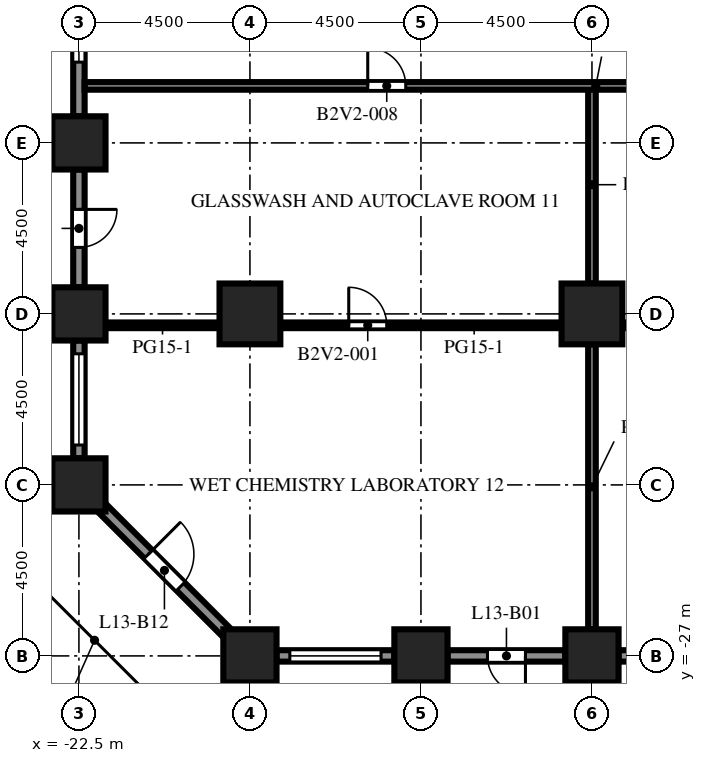
"""IFC4 building model, lengths in metres.
Left out: names, types, materials, properties, quantities, classifications, styles, units other than length and angle.
Written with IfcOpenShell. Run it as: python <this file> out.ifc"""

import sys

from ifc_helpers import new_model, si_unit, direction, frame, frame_2d, origin, origin_2d, place, context, subcontext, project, spatial, rectangle, extrude, element, fill, save


model = new_model("IFC4")
c1 = context("Model", 3, precision=1e-05, world=origin(), true_north=direction((0.0, 1.0)))
c2 = subcontext(c1, "Body", "Model", "MODEL_VIEW")
j1 = project(units=[si_unit("LENGTHUNIT", "METRE"), si_unit("PLANEANGLEUNIT", "RADIAN")], contexts=[c1])
p1 = place(None, origin())
s1 = spatial("IfcSite", under=j1, at=p1, CompositionType="ELEMENT")
p2 = place(p1, origin())
s2 = spatial("IfcBuilding", under=s1, at=p2, CompositionType="ELEMENT")
p3 = place(p2, frame((0.0, 0.0, 58.3)))
s3 = spatial("IfcBuildingStorey", under=s2, at=p3, CompositionType="ELEMENT", Elevation=58.3)
for number, where, z_axis, x_axis in (
    (1, (-22.5, -22.5, 0.0), (0.0, 0.0, 1.0), (1.0, 0.0, 0.0)),
    (2, (-22.5, -18.0, 0.0), (0.0, 0.0, 1.0), (1.0, 0.0, 0.0)),
    (3, (-22.5, -13.5, 0.0), (0.0, 0.0, 1.0), (1.0, 0.0, 0.0)),
    (4, (-18.0, -27.0, 0.0), (0.0, 0.0, 1.0), (1.0, 0.0, 0.0)),
    (5, (-13.5, -27.0, 0.0), (0.0, 0.0, 1.0), (1.0, 0.0, 0.0)),
    (6, (-9.0, -27.0, 0.0), (0.0, 0.0, 1.0), (1.0, 0.0, 0.0)),
):
    element("IfcColumn", number, at=place(p3, frame(where, z_axis=z_axis, x_axis=x_axis)), inside=s3, PredefinedType="COLUMN", context=c2, shape_type="SweptSolid", body=[
        extrude(rectangle(XDim=1.4, YDim=1.4, at=origin_2d()), origin(), (0.0, 0.0, 1.0), 4.1),
    ])
for number, where, z_axis, x_axis in (
    (7, (-18.0, -18.0, 0.0), (0.0, 0.0, 1.0), (1.0, 0.0, 0.0)),
    (8, (-9.0, -18.0, 0.0), (0.0, 0.0, 1.0), (1.0, 0.0, 0.0)),
):
    element("IfcColumn", number, at=place(p3, frame(where, z_axis=z_axis, x_axis=x_axis)), inside=s3, PredefinedType="COLUMN", context=c2, shape_type="SweptSolid", body=[
        extrude(rectangle(XDim=1.6, YDim=1.6, at=origin_2d()), origin(), (0.0, 0.0, 1.0), 4.1),
    ])
p4 = place(p3, frame((-14.2, -27.0, 0.0), z_axis=(0.0, 0.0, 1.0), x_axis=(-1.0, 0.0, 0.0)))
e9 = element("IfcWall", 9, at=p4, inside=s3, PredefinedType="SOLIDWALL", context=c2, shape_type="SweptSolid", body=[
    extrude(rectangle(XDim=3.1, YDim=0.3, at=frame_2d((1.55, 0.0))), origin(), (0.0, 0.0, 1.0), 2.75),
])
p5 = place(p4, frame((0.35, 0.0, 0.8)))
e10 = element("IfcOpeningElement", 10, at=p5, cuts=e9, PredefinedType="OPENING", context=c2, shape_type="SweptSolid", body=[
    extrude(rectangle(XDim=2.4, YDim=1.7, at=frame_2d((1.2, 0.85))), frame((0.0, 0.16, 0.0), z_axis=(0.0, -1.0, 0.0), x_axis=(1.0, 0.0, 0.0)), (0.0, 0.0, 1.0), 0.32),
])
p6 = place(p3, frame((-9.7, -27.0, 0.0), z_axis=(0.0, 0.0, 1.0), x_axis=(-1.0, 0.0, 0.0)))
e11 = element("IfcWall", 11, at=p6, inside=s3, PredefinedType="SOLIDWALL", context=c2, shape_type="SweptSolid", body=[
    extrude(rectangle(XDim=3.1, YDim=0.3, at=frame_2d((1.55, 0.0))), origin(), (0.0, 0.0, 1.0), 2.75),
])
p7 = place(p6, frame((1.05, 0.0, 0.0)))
e12 = element("IfcOpeningElement", 12, at=p7, cuts=e11, PredefinedType="OPENING", context=c2, shape_type="SweptSolid", body=[
    extrude(rectangle(XDim=1.0, YDim=2.2, at=frame_2d((0.5, 1.1))), frame((0.0, 0.16, 0.0), z_axis=(0.0, -1.0, 0.0), x_axis=(1.0, 0.0, 0.0)), (0.0, 0.0, 1.0), 0.32),
])
p8 = place(p3, frame((-5.2, -27.0, 0.0), z_axis=(0.0, 0.0, 1.0), x_axis=(-1.0, 0.0, 0.0)))
e13 = element("IfcWall", 13, at=p8, inside=s3, PredefinedType="SOLIDWALL", context=c2, shape_type="SweptSolid", body=[
    extrude(rectangle(XDim=3.1, YDim=0.3, at=frame_2d((1.55, 0.0))), origin(), (0.0, 0.0, 1.0), 2.75),
])
p9 = place(p8, frame((0.35, 0.0, 0.8)))
e14 = element("IfcOpeningElement", 14, at=p9, cuts=e13, PredefinedType="OPENING", context=c2, shape_type="SweptSolid", body=[
    extrude(rectangle(XDim=2.4, YDim=1.7, at=frame_2d((1.2, 0.85))), frame((0.0, 0.16, 0.0), z_axis=(0.0, -1.0, 0.0), x_axis=(1.0, 0.0, 0.0)), (0.0, 0.0, 1.0), 0.32),
])
p10 = place(p3, frame((-22.5, -12.8, 0.0), z_axis=(0.0, 0.0, 1.0), x_axis=(0.0, 1.0, 0.0)))
e15 = element("IfcWall", 15, at=p10, inside=s3, PredefinedType="SOLIDWALL", context=c2, shape_type="SweptSolid", body=[
    extrude(rectangle(XDim=3.1, YDim=0.3, at=frame_2d((1.55, 0.0))), origin(), (0.0, 0.0, 1.0), 2.75),
])
p11 = place(p10, frame((1.425, 0.0, 0.8)))
e16 = element("IfcOpeningElement", 16, at=p11, cuts=e15, PredefinedType="OPENING", context=c2, shape_type="SweptSolid", body=[
    extrude(rectangle(XDim=1.2, YDim=1.7, at=frame_2d((0.6, 0.85))), frame((0.0, 0.16, 0.0), z_axis=(0.0, -1.0, 0.0), x_axis=(1.0, 0.0, 0.0)), (0.0, 0.0, 1.0), 0.32),
])
p12 = place(p3, frame((-22.5, -17.3, 0.0), z_axis=(0.0, 0.0, 1.0), x_axis=(0.0, 1.0, 0.0)))
e17 = element("IfcWall", 17, at=p12, inside=s3, PredefinedType="SOLIDWALL", context=c2, shape_type="SweptSolid", body=[
    extrude(rectangle(XDim=3.1, YDim=0.3, at=frame_2d((1.55, 0.0))), origin(), (0.0, 0.0, 1.0), 2.75),
])
p13 = place(p12, frame((1.05, 0.0, 0.0)))
e18 = element("IfcOpeningElement", 18, at=p13, cuts=e17, PredefinedType="OPENING", context=c2, shape_type="SweptSolid", body=[
    extrude(rectangle(XDim=1.0, YDim=2.2, at=frame_2d((0.5, 1.1))), frame((0.0, 0.16, 0.0), z_axis=(0.0, -1.0, 0.0), x_axis=(1.0, 0.0, 0.0)), (0.0, 0.0, 1.0), 0.32),
])
p14 = place(p3, frame((-22.5, -21.8, 0.0), z_axis=(0.0, 0.0, 1.0), x_axis=(0.0, 1.0, 0.0)))
e19 = element("IfcWall", 19, at=p14, inside=s3, PredefinedType="SOLIDWALL", context=c2, shape_type="SweptSolid", body=[
    extrude(rectangle(XDim=3.1, YDim=0.3, at=frame_2d((1.55, 0.0))), origin(), (0.0, 0.0, 1.0), 2.75),
])
p15 = place(p14, frame((0.35, 0.0, 0.8)))
e20 = element("IfcOpeningElement", 20, at=p15, cuts=e19, PredefinedType="OPENING", context=c2, shape_type="SweptSolid", body=[
    extrude(rectangle(XDim=2.4, YDim=1.7, at=frame_2d((1.2, 0.85))), frame((0.0, 0.16, 0.0), z_axis=(0.0, -1.0, 0.0), x_axis=(1.0, 0.0, 0.0)), (0.0, 0.0, 1.0), 0.32),
])
p16 = place(p3, frame((-18.594, -26.406, 0.0), z_axis=(0.0, 0.0, 1.0), x_axis=(-0.707106781187, 0.707106781187, 0.0)))
e21 = element("IfcWall", 21, at=p16, inside=s3, PredefinedType="SOLIDWALL", context=c2, shape_type="SweptSolid", body=[
    extrude(rectangle(XDim=4.684, YDim=0.3, at=frame_2d((2.342, 0.0))), origin(), (0.0, 0.0, 1.0), 2.75),
])
p17 = place(p16, frame((1.742, 0.0, 0.0)))
e22 = element("IfcOpeningElement", 22, at=p17, cuts=e21, PredefinedType="OPENING", context=c2, shape_type="SweptSolid", body=[
    extrude(rectangle(XDim=1.2, YDim=2.2, at=frame_2d((0.6, 1.1))), frame((0.0, 0.16, 0.0), z_axis=(0.0, -1.0, 0.0), x_axis=(1.0, 0.0, 0.0)), (0.0, 0.0, 1.0), 0.32),
])
p18 = place(p3, frame((-9.0, -26.3, 0.0), z_axis=(0.0, 0.0, 1.0), x_axis=(0.0, 1.0, 0.0)))
e23 = element("IfcWall", 23, at=p18, inside=s3, PredefinedType="PARTITIONING", context=c2, shape_type="SweptSolid", body=[
    extrude(rectangle(XDim=7.5, YDim=0.2, at=frame_2d((3.75, 0.0))), origin(), (0.0, 0.0, 1.0), 3.65),
])
p19 = place(p3, frame((-9.0, -17.2, 0.0), z_axis=(0.0, 0.0, 1.0), x_axis=(0.0, 1.0, 0.0)))
e24 = element("IfcWall", 24, at=p19, inside=s3, PredefinedType="PARTITIONING", context=c2, shape_type="SweptSolid", body=[
    extrude(rectangle(XDim=5.2, YDim=0.2, at=frame_2d((2.6, 0.0))), origin(), (0.0, 0.0, 1.0), 3.65),
])
p20 = place(p3, frame((-21.8, -18.3, 0.0), z_axis=(0.0, 0.0, 1.0), x_axis=(1.0, 0.0, 0.0)))
e25 = element("IfcWall", 25, at=p20, inside=s3, PredefinedType="PARTITIONING", context=c2, shape_type="SweptSolid", body=[
    extrude(rectangle(XDim=3.0, YDim=0.15, at=frame_2d((1.5, 0.0))), origin(), (0.0, 0.0, 1.0), 3.65),
])
p21 = place(p3, frame((-9.8, -18.3, 0.0), z_axis=(0.0, 0.0, 1.0), x_axis=(-1.0, 0.0, 0.0)))
e26 = element("IfcWall", 26, at=p21, inside=s3, PredefinedType="PARTITIONING", context=c2, shape_type="SweptSolid", body=[
    extrude(rectangle(XDim=7.4, YDim=0.15, at=frame_2d((3.7, 0.0))), origin(), (0.0, 0.0, 1.0), 3.65),
])
p22 = place(p21, frame((4.6, 0.0, 0.0)))
e27 = element("IfcOpeningElement", 27, at=p22, cuts=e26, PredefinedType="OPENING", context=c2, shape_type="SweptSolid", body=[
    extrude(rectangle(XDim=1.0, YDim=2.1, at=frame_2d((0.5, 1.05))), frame((0.0, 0.085, 0.0), z_axis=(0.0, -1.0, 0.0), x_axis=(1.0, 0.0, 0.0)), (0.0, 0.0, 1.0), 0.17),
])
p23 = place(p3, frame((-0.8, -18.3, 0.0), z_axis=(0.0, 0.0, 1.0), x_axis=(-1.0, 0.0, 0.0)))
e28 = element("IfcWall", 28, at=p23, inside=s3, PredefinedType="PARTITIONING", context=c2, shape_type="SweptSolid", body=[
    extrude(rectangle(XDim=7.4, YDim=0.15, at=frame_2d((3.7, 0.0))), origin(), (0.0, 0.0, 1.0), 3.65),
])
p24 = place(p23, frame((1.85, 0.0, 0.0)))
e29 = element("IfcOpeningElement", 29, at=p24, cuts=e28, PredefinedType="OPENING", context=c2, shape_type="SweptSolid", body=[
    extrude(rectangle(XDim=1.0, YDim=2.1, at=frame_2d((0.5, 1.05))), frame((0.0, 0.085, 0.0), z_axis=(0.0, -1.0, 0.0), x_axis=(1.0, 0.0, 0.0)), (0.0, 0.0, 1.0), 0.17),
])
p25 = place(p3, frame((31.35, -12.0, 0.0), z_axis=(0.0, 0.0, 1.0), x_axis=(-1.0, 0.0, 0.0)))
e30 = element("IfcWall", 30, at=p25, inside=s3, PredefinedType="PARTITIONING", context=c2, shape_type="SweptSolid", body=[
    extrude(rectangle(XDim=53.7, YDim=0.2, at=frame_2d((26.85, 0.0))), origin(), (0.0, 0.0, 1.0), 3.65),
])
p26 = place(p25, frame((45.25, 0.0, 0.0)))
e31 = element("IfcOpeningElement", 31, at=p26, cuts=e30, PredefinedType="OPENING", context=c2, shape_type="SweptSolid", body=[
    extrude(rectangle(XDim=1.0, YDim=2.1, at=frame_2d((0.5, 1.05))), frame((0.0, 0.11, 0.0), z_axis=(0.0, -1.0, 0.0), x_axis=(1.0, 0.0, 0.0)), (0.0, 0.0, 1.0), 0.22),
])
p27 = place(p25, frame((34.25, 0.0, 0.0)))
e32 = element("IfcOpeningElement", 32, at=p27, cuts=e30, PredefinedType="OPENING", context=c2, shape_type="SweptSolid", body=[
    extrude(rectangle(XDim=1.0, YDim=2.1, at=frame_2d((0.5, 1.05))), frame((0.0, 0.11, 0.0), z_axis=(0.0, -1.0, 0.0), x_axis=(1.0, 0.0, 0.0)), (0.0, 0.0, 1.0), 0.22),
])
p28 = place(p25, frame((25.5, 0.0, 0.0)))
e33 = element("IfcOpeningElement", 33, at=p28, cuts=e30, PredefinedType="OPENING", context=c2, shape_type="SweptSolid", body=[
    extrude(rectangle(XDim=1.0, YDim=2.1, at=frame_2d((0.5, 1.05))), frame((0.0, 0.11, 0.0), z_axis=(0.0, -1.0, 0.0), x_axis=(1.0, 0.0, 0.0)), (0.0, 0.0, 1.0), 0.22),
])
p29 = place(p25, frame((15.0, 0.0, 0.0)))
e34 = element("IfcOpeningElement", 34, at=p29, cuts=e30, PredefinedType="OPENING", context=c2, shape_type="SweptSolid", body=[
    extrude(rectangle(XDim=1.0, YDim=2.1, at=frame_2d((0.5, 1.05))), frame((0.0, 0.11, 0.0), z_axis=(0.0, -1.0, 0.0), x_axis=(1.0, 0.0, 0.0)), (0.0, 0.0, 1.0), 0.22),
])
p30 = place(p25, frame((5.0, 0.0, 0.0)))
e35 = element("IfcOpeningElement", 35, at=p30, cuts=e30, PredefinedType="OPENING", context=c2, shape_type="SweptSolid", body=[
    extrude(rectangle(XDim=1.0, YDim=2.1, at=frame_2d((0.5, 1.05))), frame((0.0, 0.11, 0.0), z_axis=(0.0, -1.0, 0.0), x_axis=(1.0, 0.0, 0.0)), (0.0, 0.0, 1.0), 0.22),
])
p31 = place(p5, origin())
e36 = element("IfcWindow", 36, at=p31, inside=s3, PartitioningType="SINGLE_PANEL", PredefinedType="WINDOW", context=c2, shape_type="SweptSolid", body=[
    extrude(rectangle(XDim=2.4, YDim=1.7, at=frame_2d((1.2, 0.85))), frame((0.0, 0.03, 0.0), z_axis=(0.0, -1.0, 0.0), x_axis=(1.0, 0.0, 0.0)), (0.0, 0.0, 1.0), 0.06),
])
fill(e10, e36)
p32 = place(p7, origin())
e37 = element("IfcDoor", 37, at=p32, inside=s3, OperationType="SINGLE_SWING_LEFT", PredefinedType="DOOR", context=c2, shape_type="SweptSolid", body=[
    extrude(rectangle(XDim=1.0, YDim=2.2, at=frame_2d((0.5, 1.1))), frame((0.0, 0.025, 0.0), z_axis=(0.0, -1.0, 0.0), x_axis=(1.0, 0.0, 0.0)), (0.0, 0.0, 1.0), 0.05),
])
fill(e12, e37)
p33 = place(p11, origin())
e38 = element("IfcWindow", 38, at=p33, inside=s3, PartitioningType="SINGLE_PANEL", PredefinedType="WINDOW", context=c2, shape_type="SweptSolid", body=[
    extrude(rectangle(XDim=1.2, YDim=1.7, at=frame_2d((0.6, 0.85))), frame((0.0, 0.03, 0.0), z_axis=(0.0, -1.0, 0.0), x_axis=(1.0, 0.0, 0.0)), (0.0, 0.0, 1.0), 0.06),
])
fill(e16, e38)
p34 = place(p13, origin())
e39 = element("IfcDoor", 39, at=p34, inside=s3, OperationType="SINGLE_SWING_RIGHT", PredefinedType="DOOR", context=c2, shape_type="SweptSolid", body=[
    extrude(rectangle(XDim=1.0, YDim=2.2, at=frame_2d((0.5, 1.1))), frame((0.0, 0.025, 0.0), z_axis=(0.0, -1.0, 0.0), x_axis=(1.0, 0.0, 0.0)), (0.0, 0.0, 1.0), 0.05),
])
fill(e18, e39)
p35 = place(p15, origin())
e40 = element("IfcWindow", 40, at=p35, inside=s3, PartitioningType="SINGLE_PANEL", PredefinedType="WINDOW", context=c2, shape_type="SweptSolid", body=[
    extrude(rectangle(XDim=2.4, YDim=1.7, at=frame_2d((1.2, 0.85))), frame((0.0, 0.03, 0.0), z_axis=(0.0, -1.0, 0.0), x_axis=(1.0, 0.0, 0.0)), (0.0, 0.0, 1.0), 0.06),
])
fill(e20, e40)
p36 = place(p17, origin())
e41 = element("IfcDoor", 41, at=p36, inside=s3, OperationType="SINGLE_SWING_RIGHT", PredefinedType="DOOR", context=c2, shape_type="SweptSolid", body=[
    extrude(rectangle(XDim=1.2, YDim=2.2, at=frame_2d((0.6, 1.1))), frame((0.0, 0.025, 0.0), z_axis=(0.0, -1.0, 0.0), x_axis=(1.0, 0.0, 0.0)), (0.0, 0.0, 1.0), 0.05),
])
fill(e22, e41)
p37 = place(p22, origin())
e42 = element("IfcDoor", 42, at=p37, inside=s3, OperationType="SINGLE_SWING_RIGHT", PredefinedType="DOOR", context=c2, shape_type="SweptSolid", body=[
    extrude(rectangle(XDim=1.0, YDim=2.1, at=frame_2d((0.5, 1.05))), frame((0.0, 0.025, 0.0), z_axis=(0.0, -1.0, 0.0), x_axis=(1.0, 0.0, 0.0)), (0.0, 0.0, 1.0), 0.05),
])
fill(e27, e42)
p38 = place(p26, origin())
e43 = element("IfcDoor", 43, at=p38, inside=s3, OperationType="SINGLE_SWING_RIGHT", PredefinedType="DOOR", context=c2, shape_type="SweptSolid", body=[
    extrude(rectangle(XDim=1.0, YDim=2.1, at=frame_2d((0.5, 1.05))), frame((0.0, 0.025, 0.0), z_axis=(0.0, -1.0, 0.0), x_axis=(1.0, 0.0, 0.0)), (0.0, 0.0, 1.0), 0.05),
])
fill(e31, e43)
save(model, sys.argv[1])
